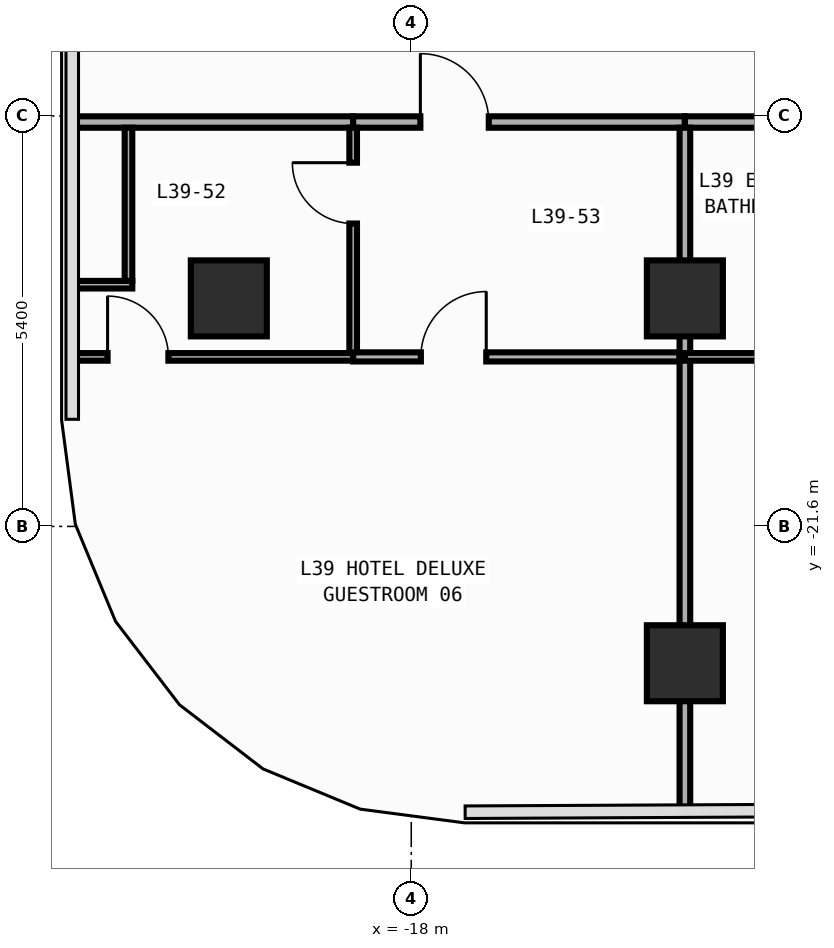
"""IFC4 building model, lengths in metres.
Left out: names, types, materials, properties, quantities, classifications, styles, units other than length and angle.
Written with IfcOpenShell. Run it as: python <this file> out.ifc"""

import sys

from ifc_helpers import new_model, si_unit, direction, frame, frame_2d, origin, origin_2d, place, context, subcontext, project, spatial, rectangle, extrude, element, fill, save


model = new_model("IFC4")
c1 = context("Model", 3, precision=1e-05, world=origin(), true_north=direction((0.0, 1.0)))
c2 = subcontext(c1, "Body", "Model", "MODEL_VIEW")
j1 = project(units=[si_unit("LENGTHUNIT", "METRE"), si_unit("PLANEANGLEUNIT", "RADIAN")], contexts=[c1])
p1 = place(None, origin())
s1 = spatial("IfcSite", under=j1, at=p1, CompositionType="ELEMENT")
p2 = place(p1, origin())
s2 = spatial("IfcBuilding", under=s1, at=p2, CompositionType="ELEMENT")
p3 = place(p2, frame((0.0, 0.0, 172.6)))
s3 = spatial("IfcBuildingStorey", under=s2, at=p3, CompositionType="ELEMENT", Elevation=172.6)
for number, where, z_axis, x_axis in (
    (1, (-20.4, -18.6, 0.0), (0.0, 0.0, 1.0), (1.0, 0.0, 0.0)),
    (2, (-14.4, -18.6, 0.0), (0.0, 0.0, 1.0), (1.0, 0.0, 0.0)),
    (3, (-14.4, -23.4, 0.0), (0.0, 0.0, 1.0), (1.0, 0.0, 0.0)),
):
    element("IfcColumn", number, at=place(p3, frame(where, z_axis=z_axis, x_axis=x_axis)), inside=s3, PredefinedType="COLUMN", context=c2, shape_type="SweptSolid", body=[
        extrude(rectangle(XDim=1.0, YDim=1.0, at=origin_2d()), origin(), (0.0, 0.0, 1.0), 3.8),
    ])
p4 = place(p3, frame((-22.455, -16.28, 0.0), z_axis=(0.0, 0.0, 1.0), x_axis=(1.0, 0.0, 0.0)))
e4 = element("IfcWall", 4, at=p4, inside=s3, PredefinedType="PARTITIONING", context=c2, shape_type="SweptSolid", body=[
    extrude(rectangle(XDim=3.691, YDim=0.15, at=frame_2d((1.846, 0.0))), origin(), (0.0, 0.0, 1.0), 3.54),
])
p5 = place(p3, frame((-18.764, -16.28, 0.0), z_axis=(0.0, 0.0, 1.0), x_axis=(1.0, 0.0, 0.0)))
e5 = element("IfcWall", 5, at=p5, inside=s3, PredefinedType="PARTITIONING", context=c2, shape_type="SweptSolid", body=[
    extrude(rectangle(XDim=4.364, YDim=0.15, at=frame_2d((2.182, 0.0))), origin(), (0.0, 0.0, 1.0), 3.54),
])
p6 = place(p5, frame((0.884, 0.0, 0.0)))
e6 = element("IfcOpeningElement", 6, at=p6, cuts=e5, PredefinedType="OPENING", context=c2, shape_type="SweptSolid", body=[
    extrude(rectangle(XDim=0.9, YDim=2.15, at=frame_2d((0.45, 1.075))), frame((0.0, 0.085, 0.0), z_axis=(0.0, -1.0, 0.0), x_axis=(1.0, 0.0, 0.0)), (0.0, 0.0, 1.0), 0.17),
])
p7 = place(p3, frame((-14.4, -16.28, 0.0), z_axis=(0.0, 0.0, 1.0), x_axis=(1.0, 0.0, 0.0)))
e7 = element("IfcWall", 7, at=p7, inside=s3, PredefinedType="PARTITIONING", context=c2, shape_type="SweptSolid", body=[
    extrude(rectangle(XDim=3.54, YDim=0.15, at=frame_2d((1.77, 0.0))), origin(), (0.0, 0.0, 1.0), 3.54),
])
p8 = place(p3, frame((-18.764, -19.32, 0.0), z_axis=(0.0, 0.0, 1.0), x_axis=(0.0, 1.0, 0.0)))
e8 = element("IfcWall", 8, at=p8, inside=s3, PredefinedType="PARTITIONING", context=c2, shape_type="SweptSolid", body=[
    extrude(rectangle(XDim=2.965, YDim=0.1, at=frame_2d((1.482, 0.0))), origin(), (0.0, 0.0, 1.0), 3.54),
])
p9 = place(p8, frame((1.705, 0.0, 0.0)))
e9 = element("IfcOpeningElement", 9, at=p9, cuts=e8, PredefinedType="OPENING", context=c2, shape_type="SweptSolid", body=[
    extrude(rectangle(XDim=0.8, YDim=2.1, at=frame_2d((0.4, 1.05))), frame((0.0, 0.06, 0.0), z_axis=(0.0, -1.0, 0.0), x_axis=(1.0, 0.0, 0.0)), (0.0, 0.0, 1.0), 0.12),
])
p10 = place(p3, frame((-22.455, -19.37, 0.0), z_axis=(0.0, 0.0, 1.0), x_axis=(1.0, 0.0, 0.0)))
e10 = element("IfcWall", 10, at=p10, inside=s3, PredefinedType="PARTITIONING", context=c2, shape_type="SweptSolid", body=[
    extrude(rectangle(XDim=3.691, YDim=0.1, at=frame_2d((1.846, 0.0))), origin(), (0.0, 0.0, 1.0), 3.54),
])
p11 = place(p10, frame((0.46, 0.0, 0.0)))
e11 = element("IfcOpeningElement", 11, at=p11, cuts=e10, PredefinedType="OPENING", context=c2, shape_type="SweptSolid", body=[
    extrude(rectangle(XDim=0.8, YDim=2.1, at=frame_2d((0.4, 1.05))), frame((0.0, 0.06, 0.0), z_axis=(0.0, -1.0, 0.0), x_axis=(1.0, 0.0, 0.0)), (0.0, 0.0, 1.0), 0.12),
])
p12 = place(p3, frame((-18.764, -19.37, 0.0), z_axis=(0.0, 0.0, 1.0), x_axis=(1.0, 0.0, 0.0)))
e12 = element("IfcWall", 12, at=p12, inside=s3, PredefinedType="PARTITIONING", context=c2, shape_type="SweptSolid", body=[
    extrude(rectangle(XDim=4.364, YDim=0.12, at=frame_2d((2.182, 0.0))), origin(), (0.0, 0.0, 1.0), 3.54),
])
p13 = place(p12, frame((0.891, 0.0, 0.0)))
e13 = element("IfcOpeningElement", 13, at=p13, cuts=e12, PredefinedType="OPENING", context=c2, shape_type="SweptSolid", body=[
    extrude(rectangle(XDim=0.86, YDim=2.15, at=frame_2d((0.43, 1.075))), frame((0.0, 0.07, 0.0), z_axis=(0.0, -1.0, 0.0), x_axis=(1.0, 0.0, 0.0)), (0.0, 0.0, 1.0), 0.14),
])
p14 = place(p3, frame((-14.4, -19.37, 0.0), z_axis=(0.0, 0.0, 1.0), x_axis=(0.0, 1.0, 0.0)))
e14 = element("IfcWall", 14, at=p14, inside=s3, PredefinedType="PARTITIONING", context=c2, shape_type="SweptSolid", body=[
    extrude(rectangle(XDim=3.015, YDim=0.14, at=frame_2d((1.508, 0.0))), origin(), (0.0, 0.0, 1.0), 2.952),
])
p15 = place(p3, frame((-14.4, -25.341, 0.0), z_axis=(0.0, 0.0, 1.0), x_axis=(0.0, 1.0, 0.0)))
e15 = element("IfcWall", 15, at=p15, inside=s3, PredefinedType="PARTITIONING", context=c2, shape_type="SweptSolid", body=[
    extrude(rectangle(XDim=5.971, YDim=0.14, at=frame_2d((2.985, 0.0))), origin(), (0.0, 0.0, 1.0), 2.952),
])
p16 = place(p3, frame((-14.4, -19.37, 0.0), z_axis=(0.0, 0.0, 1.0), x_axis=(1.0, 0.0, 0.0)))
e16 = element("IfcWall", 16, at=p16, inside=s3, PredefinedType="PARTITIONING", context=c2, shape_type="SweptSolid", body=[
    extrude(rectangle(XDim=3.54, YDim=0.1, at=frame_2d((1.77, 0.0))), origin(), (0.0, 0.0, 1.0), 3.54),
])
p17 = place(p16, frame((2.28, 0.0, 0.0)))
e17 = element("IfcOpeningElement", 17, at=p17, cuts=e16, PredefinedType="OPENING", context=c2, shape_type="SweptSolid", body=[
    extrude(rectangle(XDim=0.8, YDim=2.1, at=frame_2d((0.4, 1.05))), frame((0.0, 0.06, 0.0), z_axis=(0.0, -1.0, 0.0), x_axis=(1.0, 0.0, 0.0)), (0.0, 0.0, 1.0), 0.12),
])
p18 = place(p3, frame((-21.67, -18.42, 0.0), z_axis=(0.0, 0.0, 1.0), x_axis=(-1.0, 0.0, 0.0)))
e18 = element("IfcWall", 18, at=p18, inside=s3, PredefinedType="PARTITIONING", context=c2, shape_type="SweptSolid", body=[
    extrude(rectangle(XDim=0.785, YDim=0.1, at=frame_2d((0.393, 0.0))), origin(), (0.0, 0.0, 1.0), 3.54),
])
p19 = place(p3, frame((-21.72, -18.37, 0.0), z_axis=(0.0, 0.0, 1.0), x_axis=(0.0, 1.0, 0.0)))
e19 = element("IfcWall", 19, at=p19, inside=s3, PredefinedType="PARTITIONING", context=c2, shape_type="SweptSolid", body=[
    extrude(rectangle(XDim=2.015, YDim=0.1, at=frame_2d((1.008, 0.0))), origin(), (0.0, 0.0, 1.0), 3.54),
])
p20 = place(p6, origin())
e20 = element("IfcDoor", 20, at=p20, inside=s3, OperationType="SINGLE_SWING_LEFT", PredefinedType="DOOR", context=c2, shape_type="SweptSolid", body=[
    extrude(rectangle(XDim=0.9, YDim=2.15, at=frame_2d((0.45, 1.075))), frame((0.0, 0.025, 0.0), z_axis=(0.0, -1.0, 0.0), x_axis=(1.0, 0.0, 0.0)), (0.0, 0.0, 1.0), 0.05),
])
fill(e6, e20)
p21 = place(p9, origin())
e21 = element("IfcDoor", 21, at=p21, inside=s3, OperationType="SINGLE_SWING_RIGHT", PredefinedType="DOOR", context=c2, shape_type="SweptSolid", body=[
    extrude(rectangle(XDim=0.8, YDim=2.1, at=frame_2d((0.4, 1.05))), frame((0.0, 0.025, 0.0), z_axis=(0.0, -1.0, 0.0), x_axis=(1.0, 0.0, 0.0)), (0.0, 0.0, 1.0), 0.05),
])
fill(e9, e21)
p22 = place(p11, origin())
e22 = element("IfcDoor", 22, at=p22, inside=s3, OperationType="SINGLE_SWING_LEFT", PredefinedType="DOOR", context=c2, shape_type="SweptSolid", body=[
    extrude(rectangle(XDim=0.8, YDim=2.1, at=frame_2d((0.4, 1.05))), frame((0.0, 0.025, 0.0), z_axis=(0.0, -1.0, 0.0), x_axis=(1.0, 0.0, 0.0)), (0.0, 0.0, 1.0), 0.05),
])
fill(e11, e22)
p23 = place(p13, origin())
e23 = element("IfcDoor", 23, at=p23, inside=s3, OperationType="SINGLE_SWING_RIGHT", PredefinedType="DOOR", context=c2, shape_type="SweptSolid", body=[
    extrude(rectangle(XDim=0.86, YDim=2.15, at=frame_2d((0.43, 1.075))), frame((0.0, 0.025, 0.0), z_axis=(0.0, -1.0, 0.0), x_axis=(1.0, 0.0, 0.0)), (0.0, 0.0, 1.0), 0.05),
])
fill(e13, e23)
save(model, sys.argv[1])
